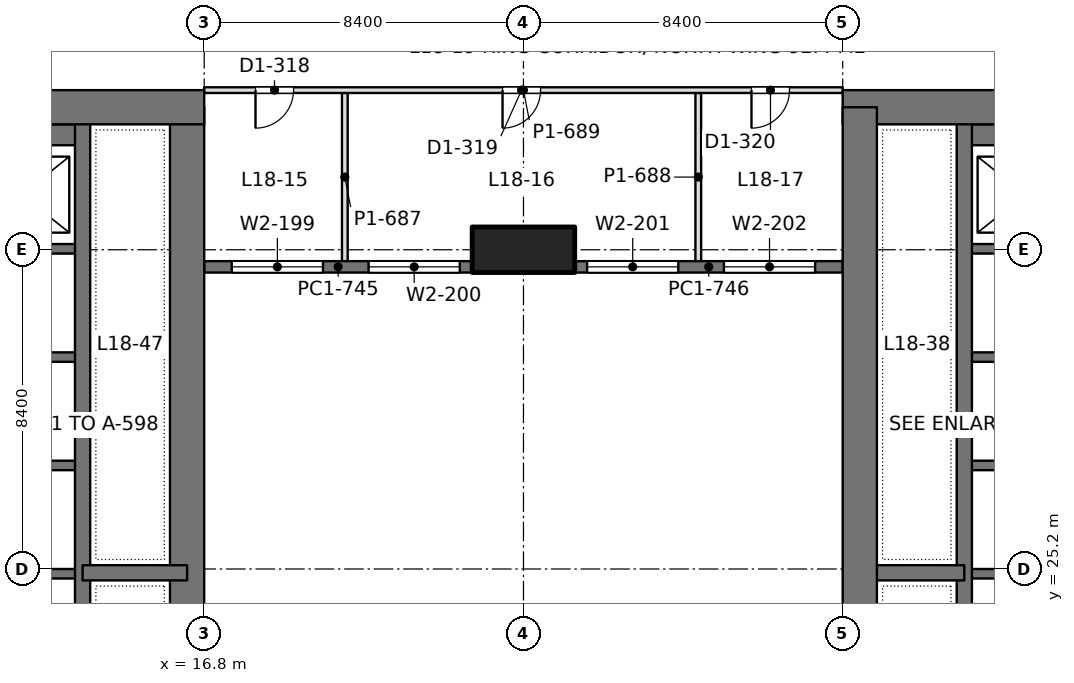
"""IFC4 building model, lengths in metres.
Left out: names, types, materials, properties, quantities, classifications, styles, units other than length and angle.
Written with IfcOpenShell. Run it as: python <this file> out.ifc"""

import sys

from ifc_helpers import new_model, si_unit, direction, frame, frame_2d, origin, origin_2d, place, context, subcontext, project, spatial, rectangle, extrude, element, fill, save


model = new_model("IFC4")
c1 = context("Model", 3, precision=1e-05, world=origin(), true_north=direction((0.0, 1.0)))
c2 = subcontext(c1, "Body", "Model", "MODEL_VIEW")
j1 = project(units=[si_unit("LENGTHUNIT", "METRE"), si_unit("PLANEANGLEUNIT", "RADIAN")], contexts=[c1])
p1 = place(None, origin())
s1 = spatial("IfcSite", under=j1, at=p1, CompositionType="ELEMENT")
p2 = place(p1, origin())
s2 = spatial("IfcBuilding", under=s1, at=p2, CompositionType="ELEMENT")
p3 = place(p2, frame((0.0, 0.0, 81.9)))
s3 = spatial("IfcBuildingStorey", under=s2, at=p3, CompositionType="ELEMENT", Elevation=81.9)
p4 = place(p3, frame((25.2, 33.6, 0.0), z_axis=(0.0, 0.0, 1.0), x_axis=(1.0, 0.0, 0.0)))
e1 = element("IfcColumn", 1, at=p4, inside=s3, PredefinedType="COLUMN", context=c2, shape_type="SweptSolid", body=[
    extrude(rectangle(XDim=2.7, YDim=1.2, at=origin_2d()), origin(), (0.0, 0.0, 1.0), 4.5),
])
p5 = place(p3, frame((-1.2, 37.35, 0.0), z_axis=(0.0, 0.0, 1.0), x_axis=(1.0, 0.0, 0.0)))
e2 = element("IfcWall", 2, at=p5, inside=s3, PredefinedType="SHEAR", context=c2, shape_type="SweptSolid", body=[
    extrude(rectangle(XDim=18.0, YDim=0.9, at=frame_2d((9.0, 0.0))), origin(), (0.0, 0.0, 1.0), 4.5),
])
p6 = place(p5, frame((8.95, 0.0, 0.0)))
e3 = element("IfcOpeningElement", 3, at=p6, cuts=e2, PredefinedType="OPENING", context=c2, shape_type="SweptSolid", body=[
    extrude(rectangle(XDim=1.8, YDim=2.4, at=frame_2d((0.9, 1.2))), frame((0.0, 0.46, 0.0), z_axis=(0.0, -1.0, 0.0), x_axis=(1.0, 0.0, 0.0)), (0.0, 0.0, 1.0), 0.92),
])
p7 = place(p3, frame((16.35, 13.05, 0.0), z_axis=(0.0, 0.0, 1.0), x_axis=(0.0, 1.0, 0.0)))
e4 = element("IfcWall", 4, at=p7, inside=s3, PredefinedType="SHEAR", context=c2, shape_type="SweptSolid", body=[
    extrude(rectangle(XDim=24.3, YDim=0.9, at=frame_2d((12.15, 0.0))), origin(), (0.0, 0.0, 1.0), 4.5),
])
p8 = place(p3, frame((13.6, 13.05, 0.0), z_axis=(0.0, 0.0, 1.0), x_axis=(0.0, 1.0, 0.0)))
e5 = element("IfcWall", 5, at=p8, inside=s3, PredefinedType="SHEAR", context=c2, shape_type="SweptSolid", body=[
    extrude(rectangle(XDim=24.3, YDim=0.4, at=frame_2d((12.15, 0.0))), origin(), (0.0, 0.0, 1.0), 4.5),
])
p9 = place(p3, frame((13.6, 25.1, 0.0), z_axis=(0.0, 0.0, 1.0), x_axis=(1.0, 0.0, 0.0)))
e6 = element("IfcWall", 6, at=p9, inside=s3, PredefinedType="SHEAR", context=c2, shape_type="SweptSolid", body=[
    extrude(rectangle(XDim=2.75, YDim=0.4, at=frame_2d((1.375, 0.0))), origin(), (0.0, 0.0, 1.0), 4.5),
])
for number, where, z_axis, x_axis in (
    (7, (10.4, 25.075, 0.0), (0.0, 0.0, 1.0), (1.0, 0.0, 0.0)),
    (8, (10.4, 27.925, 0.0), (0.0, 0.0, 1.0), (1.0, 0.0, 0.0)),
    (9, (10.4, 30.775, 0.0), (0.0, 0.0, 1.0), (1.0, 0.0, 0.0)),
    (10, (10.4, 33.625, 0.0), (0.0, 0.0, 1.0), (1.0, 0.0, 0.0)),
):
    element("IfcWall", number, at=place(p3, frame(where, z_axis=z_axis, x_axis=x_axis)), inside=s3, PredefinedType="SHEAR", context=c2, shape_type="SweptSolid", body=[
        extrude(rectangle(XDim=3.2, YDim=0.25, at=frame_2d((1.6, 0.0))), origin(), (0.0, 0.0, 1.0), 4.5),
    ])
p10 = place(p3, frame((10.4, 36.625, 0.0), z_axis=(0.0, 0.0, 1.0), x_axis=(1.0, 0.0, 0.0)))
e11 = element("IfcWall", 11, at=p10, inside=s3, PredefinedType="SHEAR", context=c2, shape_type="SweptSolid", body=[
    extrude(rectangle(XDim=3.2, YDim=0.55, at=frame_2d((1.6, 0.0))), origin(), (0.0, 0.0, 1.0), 4.5),
])
p11 = place(p3, frame((33.6, 37.35, 0.0), z_axis=(0.0, 0.0, 1.0), x_axis=(1.0, 0.0, 0.0)))
e12 = element("IfcWall", 12, at=p11, inside=s3, PredefinedType="SHEAR", context=c2, shape_type="SweptSolid", body=[
    extrude(rectangle(XDim=18.0, YDim=0.9, at=frame_2d((9.0, 0.0))), origin(), (0.0, 0.0, 1.0), 4.5),
])
p12 = place(p11, frame((7.25, 0.0, 0.0)))
e13 = element("IfcOpeningElement", 13, at=p12, cuts=e12, PredefinedType="OPENING", context=c2, shape_type="SweptSolid", body=[
    extrude(rectangle(XDim=1.8, YDim=2.4, at=frame_2d((0.9, 1.2))), frame((0.0, 0.46, 0.0), z_axis=(0.0, -1.0, 0.0), x_axis=(1.0, 0.0, 0.0)), (0.0, 0.0, 1.0), 0.92),
])
p13 = place(p3, frame((34.05, 13.05, 0.0), z_axis=(0.0, 0.0, 1.0), x_axis=(0.0, 1.0, 0.0)))
e14 = element("IfcWall", 14, at=p13, inside=s3, PredefinedType="SHEAR", context=c2, shape_type="SweptSolid", body=[
    extrude(rectangle(XDim=24.3, YDim=0.9, at=frame_2d((12.15, 0.0))), origin(), (0.0, 0.0, 1.0), 4.5),
])
p14 = place(p3, frame((36.8, 13.05, 0.0), z_axis=(0.0, 0.0, 1.0), x_axis=(0.0, 1.0, 0.0)))
e15 = element("IfcWall", 15, at=p14, inside=s3, PredefinedType="SHEAR", context=c2, shape_type="SweptSolid", body=[
    extrude(rectangle(XDim=24.3, YDim=0.4, at=frame_2d((12.15, 0.0))), origin(), (0.0, 0.0, 1.0), 4.5),
])
p15 = place(p3, frame((36.8, 25.1, 0.0), z_axis=(0.0, 0.0, 1.0), x_axis=(-1.0, 0.0, 0.0)))
e16 = element("IfcWall", 16, at=p15, inside=s3, PredefinedType="SHEAR", context=c2, shape_type="SweptSolid", body=[
    extrude(rectangle(XDim=2.75, YDim=0.4, at=frame_2d((1.375, 0.0))), origin(), (0.0, 0.0, 1.0), 4.5),
])
for number, where, z_axis, x_axis in (
    (17, (40.0, 25.075, 0.0), (0.0, 0.0, 1.0), (-1.0, 0.0, 0.0)),
    (18, (40.0, 27.925, 0.0), (0.0, 0.0, 1.0), (-1.0, 0.0, 0.0)),
    (19, (40.0, 30.775, 0.0), (0.0, 0.0, 1.0), (-1.0, 0.0, 0.0)),
    (20, (40.0, 33.625, 0.0), (0.0, 0.0, 1.0), (-1.0, 0.0, 0.0)),
):
    element("IfcWall", number, at=place(p3, frame(where, z_axis=z_axis, x_axis=x_axis)), inside=s3, PredefinedType="SHEAR", context=c2, shape_type="SweptSolid", body=[
        extrude(rectangle(XDim=3.2, YDim=0.25, at=frame_2d((1.6, 0.0))), origin(), (0.0, 0.0, 1.0), 4.5),
    ])
p16 = place(p3, frame((40.0, 36.625, 0.0), z_axis=(0.0, 0.0, 1.0), x_axis=(-1.0, 0.0, 0.0)))
e21 = element("IfcWall", 21, at=p16, inside=s3, PredefinedType="SHEAR", context=c2, shape_type="SweptSolid", body=[
    extrude(rectangle(XDim=3.2, YDim=0.55, at=frame_2d((1.6, 0.0))), origin(), (0.0, 0.0, 1.0), 4.5),
])
p17 = place(p3, frame((16.8, 33.15, 0.0), z_axis=(0.0, 0.0, 1.0), x_axis=(1.0, 0.0, 0.0)))
e22 = element("IfcWall", 22, at=p17, inside=s3, PredefinedType="SOLIDWALL", context=c2, shape_type="SweptSolid", body=[
    extrude(rectangle(XDim=7.05, YDim=0.3, at=frame_2d((3.525, 0.0))), origin(), (0.0, 0.0, 1.0), 4.34),
])
p18 = place(p17, frame((0.725, 0.0, 0.9)))
e23 = element("IfcOpeningElement", 23, at=p18, cuts=e22, PredefinedType="OPENING", context=c2, shape_type="SweptSolid", body=[
    extrude(rectangle(XDim=2.4, YDim=1.9, at=frame_2d((1.2, 0.95))), frame((0.0, 0.16, 0.0), z_axis=(0.0, -1.0, 0.0), x_axis=(1.0, 0.0, 0.0)), (0.0, 0.0, 1.0), 0.32),
])
p19 = place(p17, frame((4.325, 0.0, 0.9)))
e24 = element("IfcOpeningElement", 24, at=p19, cuts=e22, PredefinedType="OPENING", context=c2, shape_type="SweptSolid", body=[
    extrude(rectangle(XDim=2.4, YDim=1.9, at=frame_2d((1.2, 0.95))), frame((0.0, 0.16, 0.0), z_axis=(0.0, -1.0, 0.0), x_axis=(1.0, 0.0, 0.0)), (0.0, 0.0, 1.0), 0.32),
])
p20 = place(p3, frame((26.55, 33.15, 0.0), z_axis=(0.0, 0.0, 1.0), x_axis=(1.0, 0.0, 0.0)))
e25 = element("IfcWall", 25, at=p20, inside=s3, PredefinedType="SOLIDWALL", context=c2, shape_type="SweptSolid", body=[
    extrude(rectangle(XDim=7.05, YDim=0.3, at=frame_2d((3.525, 0.0))), origin(), (0.0, 0.0, 1.0), 4.34),
])
p21 = place(p20, frame((0.325, 0.0, 0.9)))
e26 = element("IfcOpeningElement", 26, at=p21, cuts=e25, PredefinedType="OPENING", context=c2, shape_type="SweptSolid", body=[
    extrude(rectangle(XDim=2.4, YDim=1.9, at=frame_2d((1.2, 0.95))), frame((0.0, 0.16, 0.0), z_axis=(0.0, -1.0, 0.0), x_axis=(1.0, 0.0, 0.0)), (0.0, 0.0, 1.0), 0.32),
])
p22 = place(p20, frame((3.925, 0.0, 0.9)))
e27 = element("IfcOpeningElement", 27, at=p22, cuts=e25, PredefinedType="OPENING", context=c2, shape_type="SweptSolid", body=[
    extrude(rectangle(XDim=2.4, YDim=1.9, at=frame_2d((1.2, 0.95))), frame((0.0, 0.16, 0.0), z_axis=(0.0, -1.0, 0.0), x_axis=(1.0, 0.0, 0.0)), (0.0, 0.0, 1.0), 0.32),
])
for number, where, z_axis, x_axis in (
    (28, (20.5, 33.298, 0.0), (0.0, 0.0, 1.0), (0.0, 1.0, 0.0)),
    (29, (29.8, 33.298, 0.0), (0.0, 0.0, 1.0), (0.0, 1.0, 0.0)),
):
    element("IfcWall", number, at=place(p3, frame(where, z_axis=z_axis, x_axis=x_axis)), inside=s3, PredefinedType="PARTITIONING", context=c2, shape_type="SweptSolid", body=[
        extrude(rectangle(XDim=4.428, YDim=0.15, at=frame_2d((2.214, 0.0))), origin(), (0.0, 0.0, 1.0), 3.65),
    ])
p23 = place(p3, frame((16.798, 37.8, 0.0), z_axis=(0.0, 0.0, 1.0), x_axis=(1.0, 0.0, 0.0)))
e30 = element("IfcWall", 30, at=p23, inside=s3, PredefinedType="PARTITIONING", context=c2, shape_type="SweptSolid", body=[
    extrude(rectangle(XDim=16.804, YDim=0.15, at=frame_2d((8.402, 0.0))), origin(), (0.0, 0.0, 1.0), 3.74),
])
p24 = place(p23, frame((1.352, 0.0, 0.0)))
e31 = element("IfcOpeningElement", 31, at=p24, cuts=e30, PredefinedType="OPENING", context=c2, shape_type="SweptSolid", body=[
    extrude(rectangle(XDim=1.0, YDim=2.2, at=frame_2d((0.5, 1.1))), frame((0.0, 0.085, 0.0), z_axis=(0.0, -1.0, 0.0), x_axis=(1.0, 0.0, 0.0)), (0.0, 0.0, 1.0), 0.17),
])
p25 = place(p23, frame((7.852, 0.0, 0.0)))
e32 = element("IfcOpeningElement", 32, at=p25, cuts=e30, PredefinedType="OPENING", context=c2, shape_type="SweptSolid", body=[
    extrude(rectangle(XDim=1.0, YDim=2.2, at=frame_2d((0.5, 1.1))), frame((0.0, 0.085, 0.0), z_axis=(0.0, -1.0, 0.0), x_axis=(1.0, 0.0, 0.0)), (0.0, 0.0, 1.0), 0.17),
])
p26 = place(p23, frame((14.402, 0.0, 0.0)))
e33 = element("IfcOpeningElement", 33, at=p26, cuts=e30, PredefinedType="OPENING", context=c2, shape_type="SweptSolid", body=[
    extrude(rectangle(XDim=1.0, YDim=2.2, at=frame_2d((0.5, 1.1))), frame((0.0, 0.085, 0.0), z_axis=(0.0, -1.0, 0.0), x_axis=(1.0, 0.0, 0.0)), (0.0, 0.0, 1.0), 0.17),
])
p27 = place(p18, origin())
e34 = element("IfcWindow", 34, at=p27, inside=s3, PartitioningType="SINGLE_PANEL", PredefinedType="WINDOW", context=c2, shape_type="SweptSolid", body=[
    extrude(rectangle(XDim=2.4, YDim=1.9, at=frame_2d((1.2, 0.95))), frame((0.0, 0.03, 0.0), z_axis=(0.0, -1.0, 0.0), x_axis=(1.0, 0.0, 0.0)), (0.0, 0.0, 1.0), 0.06),
])
fill(e23, e34)
p28 = place(p19, origin())
e35 = element("IfcWindow", 35, at=p28, inside=s3, PartitioningType="SINGLE_PANEL", PredefinedType="WINDOW", context=c2, shape_type="SweptSolid", body=[
    extrude(rectangle(XDim=2.4, YDim=1.9, at=frame_2d((1.2, 0.95))), frame((0.0, 0.03, 0.0), z_axis=(0.0, -1.0, 0.0), x_axis=(1.0, 0.0, 0.0)), (0.0, 0.0, 1.0), 0.06),
])
fill(e24, e35)
p29 = place(p21, origin())
e36 = element("IfcWindow", 36, at=p29, inside=s3, PartitioningType="SINGLE_PANEL", PredefinedType="WINDOW", context=c2, shape_type="SweptSolid", body=[
    extrude(rectangle(XDim=2.4, YDim=1.9, at=frame_2d((1.2, 0.95))), frame((0.0, 0.03, 0.0), z_axis=(0.0, -1.0, 0.0), x_axis=(1.0, 0.0, 0.0)), (0.0, 0.0, 1.0), 0.06),
])
fill(e26, e36)
p30 = place(p22, origin())
e37 = element("IfcWindow", 37, at=p30, inside=s3, PartitioningType="SINGLE_PANEL", PredefinedType="WINDOW", context=c2, shape_type="SweptSolid", body=[
    extrude(rectangle(XDim=2.4, YDim=1.9, at=frame_2d((1.2, 0.95))), frame((0.0, 0.03, 0.0), z_axis=(0.0, -1.0, 0.0), x_axis=(1.0, 0.0, 0.0)), (0.0, 0.0, 1.0), 0.06),
])
fill(e27, e37)
p31 = place(p24, frame((1.0, 0.0, 0.0), z_axis=(0.0, 0.0, 1.0), x_axis=(-1.0, 0.0, 0.0)))
e38 = element("IfcDoor", 38, at=p31, inside=s3, OperationType="SINGLE_SWING_RIGHT", PredefinedType="DOOR", context=c2, shape_type="SweptSolid", body=[
    extrude(rectangle(XDim=1.0, YDim=2.2, at=frame_2d((0.5, 1.1))), frame((0.0, 0.025, 0.0), z_axis=(0.0, -1.0, 0.0), x_axis=(1.0, 0.0, 0.0)), (0.0, 0.0, 1.0), 0.05),
])
fill(e31, e38)
p32 = place(p25, frame((1.0, 0.0, 0.0), z_axis=(0.0, 0.0, 1.0), x_axis=(-1.0, 0.0, 0.0)))
e39 = element("IfcDoor", 39, at=p32, inside=s3, OperationType="SINGLE_SWING_RIGHT", PredefinedType="DOOR", context=c2, shape_type="SweptSolid", body=[
    extrude(rectangle(XDim=1.0, YDim=2.2, at=frame_2d((0.5, 1.1))), frame((0.0, 0.025, 0.0), z_axis=(0.0, -1.0, 0.0), x_axis=(1.0, 0.0, 0.0)), (0.0, 0.0, 1.0), 0.05),
])
fill(e32, e39)
p33 = place(p26, frame((1.0, 0.0, 0.0), z_axis=(0.0, 0.0, 1.0), x_axis=(-1.0, 0.0, 0.0)))
e40 = element("IfcDoor", 40, at=p33, inside=s3, OperationType="SINGLE_SWING_RIGHT", PredefinedType="DOOR", context=c2, shape_type="SweptSolid", body=[
    extrude(rectangle(XDim=1.0, YDim=2.2, at=frame_2d((0.5, 1.1))), frame((0.0, 0.025, 0.0), z_axis=(0.0, -1.0, 0.0), x_axis=(1.0, 0.0, 0.0)), (0.0, 0.0, 1.0), 0.05),
])
fill(e33, e40)
save(model, sys.argv[1])
